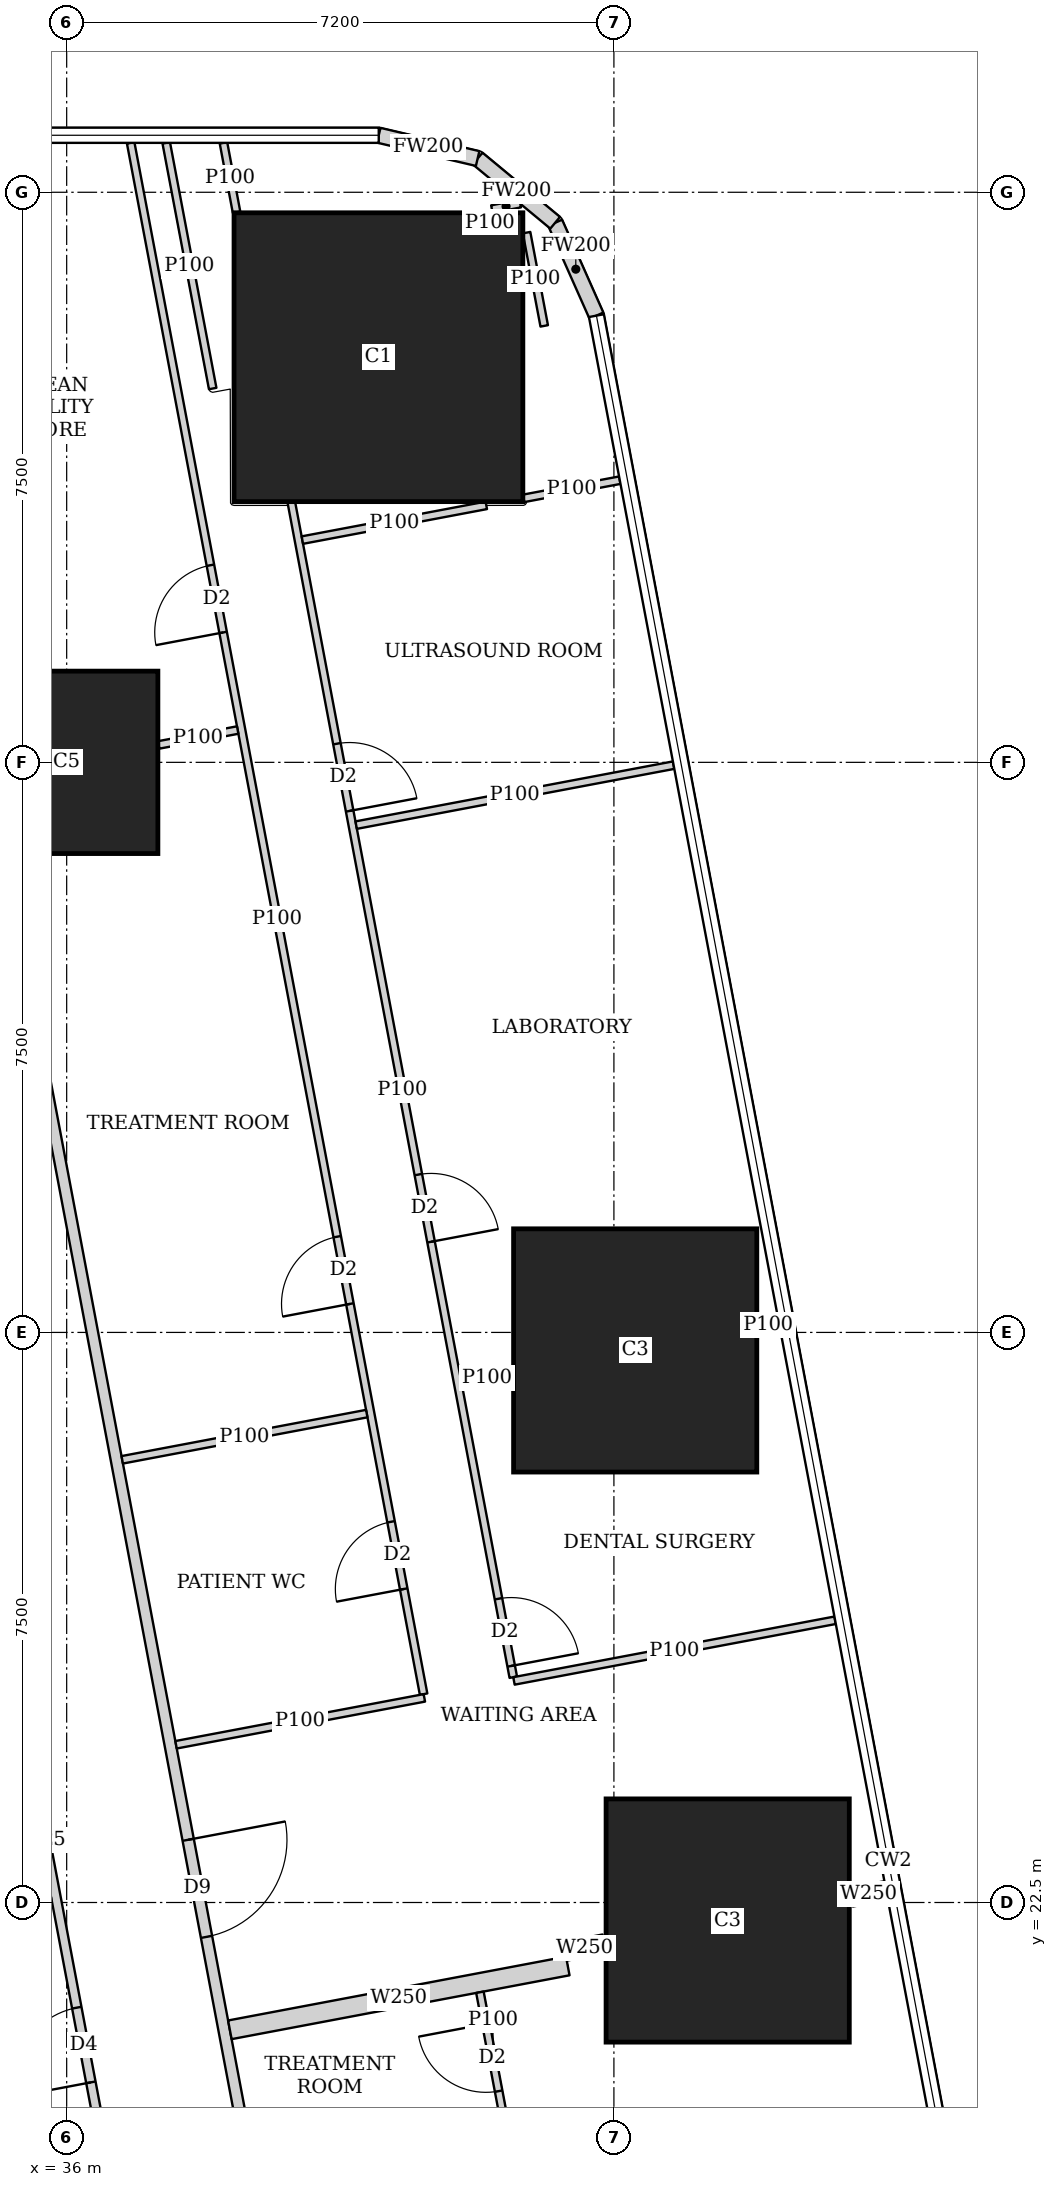
"""IFC4 building model, lengths in metres.
Left out: names, types, materials, properties, quantities, classifications, styles, units other than length and angle.
Written with IfcOpenShell. Run it as: python <this file> out.ifc"""

import sys

from ifc_helpers import new_model, si_unit, direction, frame, frame_2d, origin, origin_2d, place, context, subcontext, project, spatial, rectangle, extrude, element, fill, save


model = new_model("IFC4")
c1 = context("Model", 3, precision=1e-05, world=origin(), true_north=direction((0.0, 1.0)))
c2 = subcontext(c1, "Body", "Model", "MODEL_VIEW")
j1 = project(units=[si_unit("LENGTHUNIT", "METRE"), si_unit("PLANEANGLEUNIT", "RADIAN")], contexts=[c1])
p1 = place(None, origin())
s1 = spatial("IfcSite", under=j1, at=p1, CompositionType="ELEMENT")
p2 = place(p1, origin())
s2 = spatial("IfcBuilding", under=s1, at=p2, CompositionType="ELEMENT")
p3 = place(p2, frame((0.0, 0.0, 10.1)))
s3 = spatial("IfcBuildingStorey", under=s2, at=p3, CompositionType="ELEMENT", Elevation=10.1)
for number, where, z_axis, x_axis in (
    (1, (44.697, 22.263, 0.0), (0.0, 0.0, 1.0), (1.0, 0.0, 0.0)),
    (2, (43.48, 29.763, 0.0), (0.0, 0.0, 1.0), (1.0, 0.0, 0.0)),
):
    element("IfcColumn", number, at=place(p3, frame(where, z_axis=z_axis, x_axis=x_axis)), inside=s3, PredefinedType="COLUMN", context=c2, shape_type="SweptSolid", body=[
        extrude(rectangle(XDim=3.2, YDim=3.2, at=origin_2d()), origin(), (0.0, 0.0, 1.0), 4.5),
    ])
p4 = place(p3, frame((36.0, 37.5, 0.0), z_axis=(0.0, 0.0, 1.0), x_axis=(1.0, 0.0, 0.0)))
e3 = element("IfcColumn", 3, at=p4, inside=s3, PredefinedType="COLUMN", context=c2, shape_type="SweptSolid", body=[
    extrude(rectangle(XDim=2.4, YDim=2.4, at=origin_2d()), origin(), (0.0, 0.0, 1.0), 4.5),
])
p5 = place(p3, frame((40.102, 42.83, 0.0), z_axis=(0.0, 0.0, 1.0), x_axis=(1.0, 0.0, 0.0)))
e4 = element("IfcColumn", 4, at=p5, inside=s3, PredefinedType="COLUMN", context=c2, shape_type="SweptSolid", body=[
    extrude(rectangle(XDim=3.8, YDim=3.8, at=origin_2d()), origin(), (0.0, 0.0, 1.0), 4.5),
])
p6 = place(p3, frame((42.97, 43.377, 0.0), z_axis=(0.0, 0.0, 1.0), x_axis=(-0.406002956633, 0.913871762998, 0.0)))
e5 = element("IfcWall", 5, at=p6, inside=s3, PredefinedType="SOLIDWALL", context=c2, shape_type="SweptSolid", body=[
    extrude(rectangle(XDim=1.337, YDim=0.2, at=frame_2d((0.669, 0.0))), origin(), (0.0, 0.0, 1.0), 4.2),
])
p7 = place(p3, frame((42.427, 44.599, 0.0), z_axis=(0.0, 0.0, 1.0), x_axis=(-0.770091412544, 0.637933551655, 0.0)))
e6 = element("IfcWall", 6, at=p7, inside=s3, PredefinedType="SOLIDWALL", context=c2, shape_type="SweptSolid", body=[
    extrude(rectangle(XDim=1.324, YDim=0.2, at=frame_2d((0.662, 0.0))), origin(), (0.0, 0.0, 1.0), 4.2),
])
p8 = place(p3, frame((41.407, 45.444, 0.0), z_axis=(0.0, 0.0, 1.0), x_axis=(-0.973453091607, 0.228886606077, 0.0)))
e7 = element("IfcWall", 7, at=p8, inside=s3, PredefinedType="SOLIDWALL", context=c2, shape_type="SweptSolid", body=[
    extrude(rectangle(XDim=1.336, YDim=0.2, at=frame_2d((0.668, 0.0))), origin(), (0.0, 0.0, 1.0), 4.2),
])
p9 = place(p3, frame((35.151, 36.285, 0.0), z_axis=(0.0, 0.0, 1.0), x_axis=(0.18558085056, -0.982628998099, 0.0)))
e8 = element("IfcWall", 8, at=p9, inside=s3, PredefinedType="SOLIDWALL", context=c2, shape_type="SweptSolid", body=[
    extrude(rectangle(XDim=34.352, YDim=0.15, at=frame_2d((17.176, 0.0))), origin(), (0.0, 0.0, 1.0), 2.4),
])
p10 = place(p9, frame((13.189, 0.0, 0.0)))
e9 = element("IfcOpeningElement", 9, at=p10, cuts=e8, PredefinedType="OPENING", context=c2, shape_type="SweptSolid", body=[
    extrude(rectangle(XDim=1.3, YDim=2.1, at=frame_2d((0.65, 1.05))), frame((0.0, 0.085, 0.0), z_axis=(0.0, -1.0, 0.0), x_axis=(1.0, 0.0, 0.0)), (0.0, 0.0, 1.0), 0.17),
])
p11 = place(p9, frame((19.443, 0.0, 0.0)))
e10 = element("IfcOpeningElement", 10, at=p11, cuts=e8, PredefinedType="OPENING", context=c2, shape_type="SweptSolid", body=[
    extrude(rectangle(XDim=1.3, YDim=2.1, at=frame_2d((0.65, 1.05))), frame((0.0, 0.085, 0.0), z_axis=(0.0, -1.0, 0.0), x_axis=(1.0, 0.0, 0.0)), (0.0, 0.0, 1.0), 0.17),
])
p12 = place(p9, frame((25.444, 0.0, 0.0)))
e11 = element("IfcOpeningElement", 11, at=p12, cuts=e8, PredefinedType="OPENING", context=c2, shape_type="SweptSolid", body=[
    extrude(rectangle(XDim=1.3, YDim=2.1, at=frame_2d((0.65, 1.05))), frame((0.0, 0.085, 0.0), z_axis=(0.0, -1.0, 0.0), x_axis=(1.0, 0.0, 0.0)), (0.0, 0.0, 1.0), 0.17),
])
p13 = place(p3, frame((37.921, 42.418, 0.0), z_axis=(0.0, 0.0, 1.0), x_axis=(-0.185713480744, 0.982603940085, 0.0)))
e12 = element("IfcWall", 12, at=p13, inside=s3, PredefinedType="PARTITIONING", context=c2, shape_type="SweptSolid", body=[
    extrude(rectangle(XDim=3.289, YDim=0.1, at=frame_2d((1.645, 0.0))), origin(), (0.0, 0.0, 1.0), 2.4),
])
p14 = place(p3, frame((42.051, 44.469, 0.0), z_axis=(0.0, 0.0, 1.0), x_axis=(0.185728424166, -0.98260111564, 0.0)))
e13 = element("IfcWall", 13, at=p14, inside=s3, PredefinedType="PARTITIONING", context=c2, shape_type="SweptSolid", body=[
    extrude(rectangle(XDim=1.249, YDim=0.1, at=frame_2d((0.625, 0.0))), origin(), (0.0, 0.0, 1.0), 4.2),
])
p15 = place(p3, frame((38.063, 45.65, 0.0), z_axis=(0.0, 0.0, 1.0), x_axis=(0.185288147753, -0.982684233262, 0.0)))
e14 = element("IfcWall", 14, at=p15, inside=s3, PredefinedType="PARTITIONING", context=c2, shape_type="SweptSolid", body=[
    extrude(rectangle(XDim=0.929, YDim=0.1, at=frame_2d((0.464, 0.0))), origin(), (0.0, 0.0, 1.0), 4.2),
])
p16 = place(p3, frame((38.956, 40.92, 0.0), z_axis=(0.0, 0.0, 1.0), x_axis=(0.185636914727, -0.982618408077, 0.0)))
e15 = element("IfcWall", 15, at=p16, inside=s3, PredefinedType="PARTITIONING", context=c2, shape_type="SweptSolid", body=[
    extrude(rectangle(XDim=15.729, YDim=0.1, at=frame_2d((7.865, 0.0))), origin(), (0.0, 0.0, 1.0), 2.6),
])
p17 = place(p16, frame((14.679, 0.0, 0.0)))
e16 = element("IfcOpeningElement", 16, at=p17, cuts=e15, PredefinedType="OPENING", context=c2, shape_type="SweptSolid", body=[
    extrude(rectangle(XDim=0.9, YDim=2.1, at=frame_2d((0.45, 1.05))), frame((0.0, 0.06, 0.0), z_axis=(0.0, -1.0, 0.0), x_axis=(1.0, 0.0, 0.0)), (0.0, 0.0, 1.0), 0.12),
])
p18 = place(p16, frame((9.0, 0.0, 0.0)))
e17 = element("IfcOpeningElement", 17, at=p18, cuts=e15, PredefinedType="OPENING", context=c2, shape_type="SweptSolid", body=[
    extrude(rectangle(XDim=0.9, YDim=2.1, at=frame_2d((0.45, 1.05))), frame((0.0, 0.06, 0.0), z_axis=(0.0, -1.0, 0.0), x_axis=(1.0, 0.0, 0.0)), (0.0, 0.0, 1.0), 0.12),
])
p19 = place(p16, frame((3.231, 0.0, 0.0)))
e18 = element("IfcOpeningElement", 18, at=p19, cuts=e15, PredefinedType="OPENING", context=c2, shape_type="SweptSolid", body=[
    extrude(rectangle(XDim=0.9, YDim=2.1, at=frame_2d((0.45, 1.05))), frame((0.0, 0.06, 0.0), z_axis=(0.0, -1.0, 0.0), x_axis=(1.0, 0.0, 0.0)), (0.0, 0.0, 1.0), 0.12),
])
p20 = place(p3, frame((36.842, 45.65, 0.0), z_axis=(0.0, 0.0, 1.0), x_axis=(0.185559483963, -0.982633033188, 0.0)))
e19 = element("IfcWall", 19, at=p20, inside=s3, PredefinedType="PARTITIONING", context=c2, shape_type="SweptSolid", body=[
    extrude(rectangle(XDim=20.77, YDim=0.1, at=frame_2d((10.385, 0.0))), origin(), (0.0, 0.0, 1.0), 2.4),
])
p21 = place(p20, frame((18.462, 0.0, 0.0)))
e20 = element("IfcOpeningElement", 20, at=p21, cuts=e19, PredefinedType="OPENING", context=c2, shape_type="SweptSolid", body=[
    extrude(rectangle(XDim=0.9, YDim=2.1, at=frame_2d((0.45, 1.05))), frame((0.0, 0.06, 0.0), z_axis=(0.0, -1.0, 0.0), x_axis=(1.0, 0.0, 0.0)), (0.0, 0.0, 1.0), 0.12),
])
p22 = place(p20, frame((14.645, 0.0, 0.0)))
e21 = element("IfcOpeningElement", 21, at=p22, cuts=e19, PredefinedType="OPENING", context=c2, shape_type="SweptSolid", body=[
    extrude(rectangle(XDim=0.9, YDim=2.1, at=frame_2d((0.45, 1.05))), frame((0.0, 0.06, 0.0), z_axis=(0.0, -1.0, 0.0), x_axis=(1.0, 0.0, 0.0)), (0.0, 0.0, 1.0), 0.12),
])
p23 = place(p20, frame((5.655, 0.0, 0.0)))
e22 = element("IfcOpeningElement", 22, at=p23, cuts=e19, PredefinedType="OPENING", context=c2, shape_type="SweptSolid", body=[
    extrude(rectangle(XDim=0.9, YDim=2.1, at=frame_2d((0.45, 1.05))), frame((0.0, 0.06, 0.0), z_axis=(0.0, -1.0, 0.0), x_axis=(1.0, 0.0, 0.0)), (0.0, 0.0, 1.0), 0.12),
])
p24 = place(p3, frame((41.968, 44.85, 0.0), z_axis=(0.0, 0.0, 1.0), x_axis=(-0.982433858219, -0.186611131032, 0.0)))
e23 = element("IfcWall", 23, at=p24, inside=s3, PredefinedType="PARTITIONING", context=c2, shape_type="SweptSolid", body=[
    extrude(rectangle(XDim=0.381, YDim=0.1, at=frame_2d((0.19, 0.0))), origin(), (0.0, 0.0, 1.0), 4.2),
])
p25 = place(p3, frame((43.277, 41.212, 0.0), z_axis=(0.0, 0.0, 1.0), x_axis=(-0.982617952949, -0.185639323801, 0.0)))
e24 = element("IfcWall", 24, at=p25, inside=s3, PredefinedType="PARTITIONING", context=c2, shape_type="SweptSolid", body=[
    extrude(rectangle(XDim=1.288, YDim=0.1, at=frame_2d((0.644, 0.0))), origin(), (0.0, 0.0, 1.0), 2.4),
])
p26 = place(p3, frame((41.521, 40.881, 0.0), z_axis=(0.0, 0.0, 1.0), x_axis=(-0.982628922785, -0.18558124934, 0.0)))
e25 = element("IfcWall", 25, at=p26, inside=s3, PredefinedType="PARTITIONING", context=c2, shape_type="SweptSolid", body=[
    extrude(rectangle(XDim=2.463, YDim=0.1, at=frame_2d((1.231, 0.0))), origin(), (0.0, 0.0, 1.0), 2.4),
])
p27 = place(p3, frame((43.985, 37.463, 0.0), z_axis=(0.0, 0.0, 1.0), x_axis=(-0.982623519589, -0.185609856287, 0.0)))
e26 = element("IfcWall", 26, at=p27, inside=s3, PredefinedType="PARTITIONING", context=c2, shape_type="SweptSolid", body=[
    extrude(rectangle(XDim=4.25, YDim=0.1, at=frame_2d((2.125, 0.0))), origin(), (0.0, 0.0, 1.0), 2.4),
])
p28 = place(p3, frame((45.372, 30.121, 0.0), z_axis=(0.0, 0.0, 1.0), x_axis=(-0.982804690287, -0.184648153933, 0.0)))
e27 = element("IfcWall", 27, at=p28, inside=s3, PredefinedType="PARTITIONING", context=c2, shape_type="SweptSolid", body=[
    extrude(rectangle(XDim=0.287, YDim=0.1, at=frame_2d((0.144, 0.0))), origin(), (0.0, 0.0, 1.0), 4.2),
])
p29 = place(p3, frame((41.87, 29.459, 0.0), z_axis=(0.0, 0.0, 1.0), x_axis=(-0.982722777639, -0.185083608972, 0.0)))
e28 = element("IfcWall", 28, at=p29, inside=s3, PredefinedType="PARTITIONING", context=c2, shape_type="SweptSolid", body=[
    extrude(rectangle(XDim=0.686, YDim=0.1, at=frame_2d((0.343, 0.0))), origin(), (0.0, 0.0, 1.0), 2.6),
])
p30 = place(p3, frame((46.11, 26.213, 0.0), z_axis=(0.0, 0.0, 1.0), x_axis=(-0.982633535512, -0.185556823879, 0.0)))
e29 = element("IfcWall", 29, at=p30, inside=s3, PredefinedType="PARTITIONING", context=c2, shape_type="SweptSolid", body=[
    extrude(rectangle(XDim=4.3, YDim=0.1, at=frame_2d((2.15, 0.0))), origin(), (0.0, 0.0, 1.0), 2.4),
])
p31 = place(p3, frame((38.25, 37.925, 0.0), z_axis=(0.0, 0.0, 1.0), x_axis=(-0.982694151031, -0.185235540676, 0.0)))
e30 = element("IfcWall", 30, at=p31, inside=s3, PredefinedType="PARTITIONING", context=c2, shape_type="SweptSolid", body=[
    extrude(rectangle(XDim=1.058, YDim=0.1, at=frame_2d((0.529, 0.0))), origin(), (0.0, 0.0, 1.0), 4.2),
])
p32 = place(p3, frame((39.948, 28.932, 0.0), z_axis=(0.0, 0.0, 1.0), x_axis=(-0.982610347627, -0.185679575441, 0.0)))
e31 = element("IfcWall", 31, at=p32, inside=s3, PredefinedType="PARTITIONING", context=c2, shape_type="SweptSolid", body=[
    extrude(rectangle(XDim=3.274, YDim=0.1, at=frame_2d((1.637, 0.0))), origin(), (0.0, 0.0, 1.0), 2.6),
])
p33 = place(p3, frame((40.706, 25.192, 0.0), z_axis=(0.0, 0.0, 1.0), x_axis=(-0.982633623707, -0.185556356831, 0.0)))
e32 = element("IfcWall", 32, at=p33, inside=s3, PredefinedType="PARTITIONING", context=c2, shape_type="SweptSolid", body=[
    extrude(rectangle(XDim=3.325, YDim=0.1, at=frame_2d((1.663, 0.0))), origin(), (0.0, 0.0, 1.0), 4.2),
])
p34 = place(p3, frame((41.437, 21.319, 0.0), z_axis=(0.0, 0.0, 1.0), x_axis=(0.186029078128, -0.982544239254, 0.0)))
e33 = element("IfcWall", 33, at=p34, inside=s3, PredefinedType="PARTITIONING", context=c2, shape_type="SweptSolid", body=[
    extrude(rectangle(XDim=1.854, YDim=0.1, at=frame_2d((0.927, 0.0))), origin(), (0.0, 0.0, 1.0), 4.2),
])
p35 = place(p34, frame((0.424, 0.0, 0.0)))
e34 = element("IfcOpeningElement", 34, at=p35, cuts=e33, PredefinedType="OPENING", context=c2, shape_type="SweptSolid", body=[
    extrude(rectangle(XDim=0.9, YDim=2.1, at=frame_2d((0.45, 1.05))), frame((0.0, 0.06, 0.0), z_axis=(0.0, -1.0, 0.0), x_axis=(1.0, 0.0, 0.0)), (0.0, 0.0, 1.0), 0.12),
])
p36 = place(p3, frame((46.782, 22.657, 0.0), z_axis=(0.0, 0.0, 1.0), x_axis=(-0.982683117999, -0.185294062504, 0.0)))
e35 = element("IfcWall", 35, at=p36, inside=s3, PredefinedType="SOLIDWALL", context=c2, shape_type="SweptSolid", body=[
    extrude(rectangle(XDim=0.469, YDim=0.25, at=frame_2d((0.234, 0.0))), origin(), (0.0, 0.0, 1.0), 2.4),
])
p37 = place(p3, frame((43.073, 21.956, 0.0), z_axis=(0.0, 0.0, 1.0), x_axis=(-0.982395465615, -0.18681313963, 0.0)))
e36 = element("IfcWall", 36, at=p37, inside=s3, PredefinedType="SOLIDWALL", context=c2, shape_type="SweptSolid", body=[
    extrude(rectangle(XDim=0.525, YDim=0.25, at=frame_2d((0.263, 0.0))), origin(), (0.0, 0.0, 1.0), 2.6),
])
p38 = place(p3, frame((42.593, 21.665, 0.0), z_axis=(0.0, 0.0, 1.0), x_axis=(-0.982612837616, -0.185666398014, 0.0)))
e37 = element("IfcWall", 37, at=p38, inside=s3, PredefinedType="SOLIDWALL", context=c2, shape_type="SweptSolid", body=[
    extrude(rectangle(XDim=4.525, YDim=0.25, at=frame_2d((2.262, 0.0))), origin(), (0.0, 0.0, 1.0), 2.6),
])
p39 = place(p3, frame((37.059, 16.213, 0.0), z_axis=(0.0, 0.0, 1.0), x_axis=(-0.185585225745, 0.982628171785, 0.0)))
e38 = element("IfcWall", 38, at=p39, inside=s3, PredefinedType="PARTITIONING", context=c2, shape_type="SweptSolid", body=[
    extrude(rectangle(XDim=15.072, YDim=0.125, at=frame_2d((7.536, 0.0))), origin(), (0.0, 0.0, 1.0), 2.6),
])
p40 = place(p39, frame((7.221, 0.0, 0.0)))
e39 = element("IfcOpeningElement", 39, at=p40, cuts=e38, PredefinedType="OPENING", context=c2, shape_type="SweptSolid", body=[
    extrude(rectangle(XDim=1.0, YDim=2.1, at=frame_2d((0.5, 1.05))), frame((0.0, 0.073, 0.0), z_axis=(0.0, -1.0, 0.0), x_axis=(1.0, 0.0, 0.0)), (0.0, 0.0, 1.0), 0.145),
])
p41 = place(p39, frame((0.25, 0.0, 0.0)))
e40 = element("IfcOpeningElement", 40, at=p41, cuts=e38, PredefinedType="OPENING", context=c2, shape_type="SweptSolid", body=[
    extrude(rectangle(XDim=1.0, YDim=2.1, at=frame_2d((0.5, 1.05))), frame((0.0, 0.073, 0.0), z_axis=(0.0, -1.0, 0.0), x_axis=(1.0, 0.0, 0.0)), (0.0, 0.0, 1.0), 0.145),
])
p42 = place(p39, frame((3.99, 0.0, 0.0)))
e41 = element("IfcOpeningElement", 41, at=p42, cuts=e38, PredefinedType="OPENING", context=c2, shape_type="SweptSolid", body=[
    extrude(rectangle(XDim=1.0, YDim=2.1, at=frame_2d((0.5, 1.05))), frame((0.0, 0.073, 0.0), z_axis=(0.0, -1.0, 0.0), x_axis=(1.0, 0.0, 0.0)), (0.0, 0.0, 1.0), 0.145),
])
p43 = place(p17, origin())
e42 = element("IfcDoor", 42, at=p43, inside=s3, OperationType="SINGLE_SWING_RIGHT", PredefinedType="DOOR", context=c2, shape_type="SweptSolid", body=[
    extrude(rectangle(XDim=0.9, YDim=2.1, at=frame_2d((0.45, 1.05))), frame((0.0, 0.025, 0.0), z_axis=(0.0, -1.0, 0.0), x_axis=(1.0, 0.0, 0.0)), (0.0, 0.0, 1.0), 0.05),
])
fill(e16, e42)
p44 = place(p18, origin())
e43 = element("IfcDoor", 43, at=p44, inside=s3, OperationType="SINGLE_SWING_RIGHT", PredefinedType="DOOR", context=c2, shape_type="SweptSolid", body=[
    extrude(rectangle(XDim=0.9, YDim=2.1, at=frame_2d((0.45, 1.05))), frame((0.0, 0.025, 0.0), z_axis=(0.0, -1.0, 0.0), x_axis=(1.0, 0.0, 0.0)), (0.0, 0.0, 1.0), 0.05),
])
fill(e17, e43)
p45 = place(p19, origin())
e44 = element("IfcDoor", 44, at=p45, inside=s3, OperationType="SINGLE_SWING_RIGHT", PredefinedType="DOOR", context=c2, shape_type="SweptSolid", body=[
    extrude(rectangle(XDim=0.9, YDim=2.1, at=frame_2d((0.45, 1.05))), frame((0.0, 0.025, 0.0), z_axis=(0.0, -1.0, 0.0), x_axis=(1.0, 0.0, 0.0)), (0.0, 0.0, 1.0), 0.05),
])
fill(e18, e44)
p46 = place(p21, origin())
e45 = element("IfcDoor", 45, at=p46, inside=s3, OperationType="SINGLE_SWING_LEFT", PredefinedType="DOOR", context=c2, shape_type="SweptSolid", body=[
    extrude(rectangle(XDim=0.9, YDim=2.1, at=frame_2d((0.45, 1.05))), frame((0.0, 0.025, 0.0), z_axis=(0.0, -1.0, 0.0), x_axis=(1.0, 0.0, 0.0)), (0.0, 0.0, 1.0), 0.05),
])
fill(e20, e45)
p47 = place(p22, origin())
e46 = element("IfcDoor", 46, at=p47, inside=s3, OperationType="SINGLE_SWING_LEFT", PredefinedType="DOOR", context=c2, shape_type="SweptSolid", body=[
    extrude(rectangle(XDim=0.9, YDim=2.1, at=frame_2d((0.45, 1.05))), frame((0.0, 0.025, 0.0), z_axis=(0.0, -1.0, 0.0), x_axis=(1.0, 0.0, 0.0)), (0.0, 0.0, 1.0), 0.05),
])
fill(e21, e46)
p48 = place(p23, origin())
e47 = element("IfcDoor", 47, at=p48, inside=s3, OperationType="SINGLE_SWING_LEFT", PredefinedType="DOOR", context=c2, shape_type="SweptSolid", body=[
    extrude(rectangle(XDim=0.9, YDim=2.1, at=frame_2d((0.45, 1.05))), frame((0.0, 0.025, 0.0), z_axis=(0.0, -1.0, 0.0), x_axis=(1.0, 0.0, 0.0)), (0.0, 0.0, 1.0), 0.05),
])
fill(e22, e47)
p49 = place(p10, origin())
e48 = element("IfcDoor", 48, at=p49, inside=s3, OperationType="DOUBLE_DOOR_SINGLE_SWING", PredefinedType="DOOR", context=c2, shape_type="SweptSolid", body=[
    extrude(rectangle(XDim=1.3, YDim=2.1, at=frame_2d((0.65, 1.05))), frame((0.0, 0.025, 0.0), z_axis=(0.0, -1.0, 0.0), x_axis=(1.0, 0.0, 0.0)), (0.0, 0.0, 1.0), 0.05),
])
fill(e9, e48)
p50 = place(p35, origin())
e49 = element("IfcDoor", 49, at=p50, inside=s3, OperationType="SINGLE_SWING_RIGHT", PredefinedType="DOOR", context=c2, shape_type="SweptSolid", body=[
    extrude(rectangle(XDim=0.9, YDim=2.1, at=frame_2d((0.45, 1.05))), frame((0.0, 0.025, 0.0), z_axis=(0.0, -1.0, 0.0), x_axis=(1.0, 0.0, 0.0)), (0.0, 0.0, 1.0), 0.05),
])
fill(e34, e49)
p51 = place(p42, origin())
e50 = element("IfcDoor", 50, at=p51, inside=s3, OperationType="SINGLE_SWING_LEFT", PredefinedType="DOOR", context=c2, shape_type="SweptSolid", body=[
    extrude(rectangle(XDim=1.0, YDim=2.1, at=frame_2d((0.5, 1.05))), frame((0.0, 0.025, 0.0), z_axis=(0.0, -1.0, 0.0), x_axis=(1.0, 0.0, 0.0)), (0.0, 0.0, 1.0), 0.05),
])
fill(e41, e50)
save(model, sys.argv[1])
